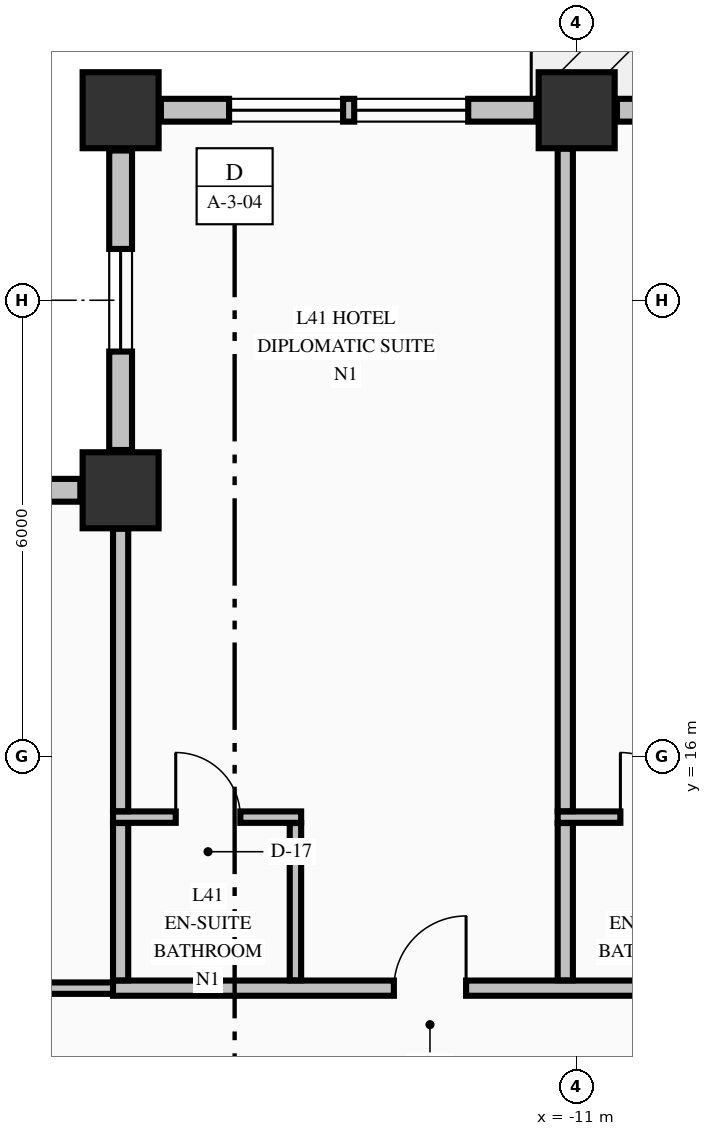
"""IFC4 building model, lengths in metres.
Left out: names, types, materials, properties, quantities, classifications, styles, units other than length and angle.
Written with IfcOpenShell. Run it as: python <this file> out.ifc"""

import sys

from ifc_helpers import new_model, si_unit, direction, frame, frame_2d, origin, origin_2d, place, context, subcontext, project, spatial, rectangle, extrude, element, fill, save


model = new_model("IFC4")
c1 = context("Model", 3, precision=1e-05, world=origin(), true_north=direction((0.0, 1.0)))
c2 = subcontext(c1, "Body", "Model", "MODEL_VIEW")
j1 = project(units=[si_unit("LENGTHUNIT", "METRE"), si_unit("PLANEANGLEUNIT", "RADIAN")], contexts=[c1])
p1 = place(None, origin())
s1 = spatial("IfcSite", under=j1, at=p1, CompositionType="ELEMENT")
p2 = place(p1, origin())
s2 = spatial("IfcBuilding", under=s1, at=p2, CompositionType="ELEMENT")
p3 = place(p2, frame((0.0, 0.0, 162.66)))
s3 = spatial("IfcBuildingStorey", under=s2, at=p3, CompositionType="ELEMENT", Elevation=162.66)
for number, where, z_axis, x_axis in (
    (1, (-17.0, 24.5, -0.25), (0.0, 0.0, 1.0), (1.0, 0.0, 0.0)),
    (2, (-11.0, 24.5, -0.25), (0.0, 0.0, 1.0), (1.0, 0.0, 0.0)),
    (3, (-17.0, 19.5, -0.25), (0.0, 0.0, 1.0), (1.0, 0.0, 0.0)),
):
    element("IfcColumn", number, at=place(p3, frame(where, z_axis=z_axis, x_axis=x_axis)), inside=s3, PredefinedType="COLUMN", context=c2, shape_type="SweptSolid", body=[
        extrude(rectangle(XDim=1.0, YDim=1.0, at=origin_2d()), origin(), (0.0, 0.0, 1.0), 3.4),
    ])
p4 = place(p3, frame((-17.0, 23.97, 0.0), z_axis=(0.0, 0.0, 1.0), x_axis=(0.0, -1.0, 0.0)))
e4 = element("IfcWall", 4, at=p4, inside=s3, PredefinedType="STANDARD", context=c2, shape_type="SweptSolid", body=[
    extrude(rectangle(XDim=3.94, YDim=0.3, at=frame_2d((1.97, 0.0))), origin(), (0.0, 0.0, 1.0), 2.542),
])
p5 = place(p4, frame((1.295, 0.0, 0.68)))
e5 = element("IfcOpeningElement", 5, at=p5, cuts=e4, PredefinedType="OPENING", context=c2, shape_type="SweptSolid", body=[
    extrude(rectangle(XDim=1.35, YDim=1.42, at=frame_2d((0.675, 0.71))), frame((0.0, 0.16, 0.0), z_axis=(0.0, -1.0, 0.0), x_axis=(1.0, 0.0, 0.0)), (0.0, 0.0, 1.0), 0.32),
])
p6 = place(p3, frame((-17.53, 19.5, 0.0), z_axis=(0.0, 0.0, 1.0), x_axis=(-1.0, 0.0, 0.0)))
e6 = element("IfcWall", 6, at=p6, inside=s3, PredefinedType="STANDARD", context=c2, shape_type="SweptSolid", body=[
    extrude(rectangle(XDim=3.94, YDim=0.3, at=frame_2d((1.97, 0.0))), origin(), (0.0, 0.0, 1.0), 2.542),
])
p7 = place(p6, frame((1.295, 0.0, 0.68)))
e7 = element("IfcOpeningElement", 7, at=p7, cuts=e6, PredefinedType="OPENING", context=c2, shape_type="SweptSolid", body=[
    extrude(rectangle(XDim=1.35, YDim=1.42, at=frame_2d((0.675, 0.71))), frame((0.0, 0.16, 0.0), z_axis=(0.0, -1.0, 0.0), x_axis=(1.0, 0.0, 0.0)), (0.0, 0.0, 1.0), 0.32),
])
p8 = place(p3, frame((-11.53, 24.5, 0.0), z_axis=(0.0, 0.0, 1.0), x_axis=(-1.0, 0.0, 0.0)))
e8 = element("IfcWall", 8, at=p8, inside=s3, PredefinedType="STANDARD", context=c2, shape_type="SweptSolid", body=[
    extrude(rectangle(XDim=4.94, YDim=0.3, at=frame_2d((2.47, 0.0))), origin(), (0.0, 0.0, 1.0), 2.542),
])
p9 = place(p8, frame((0.897, 0.0, 0.72)))
e9 = element("IfcOpeningElement", 9, at=p9, cuts=e8, PredefinedType="OPENING", context=c2, shape_type="SweptSolid", body=[
    extrude(rectangle(XDim=1.5, YDim=1.6, at=frame_2d((0.75, 0.8))), frame((0.0, 0.16, 0.0), z_axis=(0.0, -1.0, 0.0), x_axis=(1.0, 0.0, 0.0)), (0.0, 0.0, 1.0), 0.32),
])
p10 = place(p8, frame((2.543, 0.0, 0.72)))
e10 = element("IfcOpeningElement", 10, at=p10, cuts=e8, PredefinedType="OPENING", context=c2, shape_type="SweptSolid", body=[
    extrude(rectangle(XDim=1.5, YDim=1.6, at=frame_2d((0.75, 0.8))), frame((0.0, 0.16, 0.0), z_axis=(0.0, -1.0, 0.0), x_axis=(1.0, 0.0, 0.0)), (0.0, 0.0, 1.0), 0.32),
])
p11 = place(p3, frame((-0.53, 24.5, 0.0), z_axis=(0.0, 0.0, 1.0), x_axis=(-1.0, 0.0, 0.0)))
e11 = element("IfcWall", 11, at=p11, inside=s3, PredefinedType="STANDARD", context=c2, shape_type="SweptSolid", body=[
    extrude(rectangle(XDim=9.94, YDim=0.3, at=frame_2d((4.97, 0.0))), origin(), (0.0, 0.0, 1.0), 2.542),
])
p12 = place(p11, frame((3.717, 0.0, 0.0)))
e12 = element("IfcOpeningElement", 12, at=p12, cuts=e11, PredefinedType="OPENING", context=c2, shape_type="SweptSolid", body=[
    extrude(rectangle(XDim=1.1, YDim=2.15, at=frame_2d((0.55, 1.075))), frame((0.0, 0.16, 0.0), z_axis=(0.0, -1.0, 0.0), x_axis=(1.0, 0.0, 0.0)), (0.0, 0.0, 1.0), 0.32),
])
p13 = place(p11, frame((1.238, 0.0, 0.72)))
e13 = element("IfcOpeningElement", 13, at=p13, cuts=e11, PredefinedType="OPENING", context=c2, shape_type="SweptSolid", body=[
    extrude(rectangle(XDim=1.5, YDim=1.6, at=frame_2d((0.75, 0.8))), frame((0.0, 0.16, 0.0), z_axis=(0.0, -1.0, 0.0), x_axis=(1.0, 0.0, 0.0)), (0.0, 0.0, 1.0), 0.32),
])
p14 = place(p11, frame((7.202, 0.0, 0.72)))
e14 = element("IfcOpeningElement", 14, at=p14, cuts=e11, PredefinedType="OPENING", context=c2, shape_type="SweptSolid", body=[
    extrude(rectangle(XDim=1.5, YDim=1.6, at=frame_2d((0.75, 0.8))), frame((0.0, 0.16, 0.0), z_axis=(0.0, -1.0, 0.0), x_axis=(1.0, 0.0, 0.0)), (0.0, 0.0, 1.0), 0.32),
])
p15 = place(p3, frame((-20.075, 12.95, 0.0), z_axis=(0.0, 0.0, 1.0), x_axis=(1.0, 0.0, 0.0)))
e15 = element("IfcWall", 15, at=p15, inside=s3, PredefinedType="PARTITIONING", context=c2, shape_type="SweptSolid", body=[
    extrude(rectangle(XDim=3.175, YDim=0.15, at=frame_2d((1.587, 0.0))), origin(), (0.0, 0.0, 1.0), 3.15),
])
p16 = place(p3, frame((-17.1, 12.95, 0.0), z_axis=(0.0, 0.0, 1.0), x_axis=(1.0, 0.0, 0.0)))
e16 = element("IfcWall", 16, at=p16, inside=s3, PredefinedType="PARTITIONING", context=c2, shape_type="SweptSolid", body=[
    extrude(rectangle(XDim=39.2, YDim=0.2, at=frame_2d((19.6, 0.0))), origin(), (0.0, 0.0, 1.0), 3.15),
])
p17 = place(p16, frame((3.695, 0.0, 0.0)))
e17 = element("IfcOpeningElement", 17, at=p17, cuts=e16, PredefinedType="OPENING", context=c2, shape_type="SweptSolid", body=[
    extrude(rectangle(XDim=0.95, YDim=2.15, at=frame_2d((0.475, 1.075))), frame((0.0, 0.11, 0.0), z_axis=(0.0, -1.0, 0.0), x_axis=(1.0, 0.0, 0.0)), (0.0, 0.0, 1.0), 0.22),
])
p18 = place(p16, frame((12.925, 0.0, 0.0)))
e18 = element("IfcOpeningElement", 18, at=p18, cuts=e16, PredefinedType="OPENING", context=c2, shape_type="SweptSolid", body=[
    extrude(rectangle(XDim=0.95, YDim=2.15, at=frame_2d((0.475, 1.075))), frame((0.0, 0.11, 0.0), z_axis=(0.0, -1.0, 0.0), x_axis=(1.0, 0.0, 0.0)), (0.0, 0.0, 1.0), 0.22),
])
p19 = place(p16, frame((24.525, 0.0, 0.0)))
e19 = element("IfcOpeningElement", 19, at=p19, cuts=e16, PredefinedType="OPENING", context=c2, shape_type="SweptSolid", body=[
    extrude(rectangle(XDim=0.95, YDim=2.15, at=frame_2d((0.475, 1.075))), frame((0.0, 0.11, 0.0), z_axis=(0.0, -1.0, 0.0), x_axis=(1.0, 0.0, 0.0)), (0.0, 0.0, 1.0), 0.22),
])
p20 = place(p16, frame((33.695, 0.0, 0.0)))
e20 = element("IfcOpeningElement", 20, at=p20, cuts=e16, PredefinedType="OPENING", context=c2, shape_type="SweptSolid", body=[
    extrude(rectangle(XDim=0.95, YDim=2.15, at=frame_2d((0.475, 1.075))), frame((0.0, 0.11, 0.0), z_axis=(0.0, -1.0, 0.0), x_axis=(1.0, 0.0, 0.0)), (0.0, 0.0, 1.0), 0.22),
])
p21 = place(p3, frame((-17.1, 15.2, 0.0), z_axis=(0.0, 0.0, 1.0), x_axis=(1.0, 0.0, 0.0)))
e21 = element("IfcWall", 21, at=p21, inside=s3, PredefinedType="PARTITIONING", context=c2, shape_type="SweptSolid", body=[
    extrude(rectangle(XDim=2.475, YDim=0.15, at=frame_2d((1.238, 0.0))), origin(), (0.0, 0.0, 1.0), 3.15),
])
p22 = place(p21, frame((0.825, 0.0, 0.0)))
e22 = element("IfcOpeningElement", 22, at=p22, cuts=e21, PredefinedType="OPENING", context=c2, shape_type="SweptSolid", body=[
    extrude(rectangle(XDim=0.85, YDim=2.1, at=frame_2d((0.425, 1.05))), frame((0.0, 0.085, 0.0), z_axis=(0.0, -1.0, 0.0), x_axis=(1.0, 0.0, 0.0)), (0.0, 0.0, 1.0), 0.17),
])
p23 = place(p3, frame((-11.25, 15.2, 0.0), z_axis=(0.0, 0.0, 1.0), x_axis=(1.0, 0.0, 0.0)))
e23 = element("IfcWall", 23, at=p23, inside=s3, PredefinedType="PARTITIONING", context=c2, shape_type="SweptSolid", body=[
    extrude(rectangle(XDim=2.475, YDim=0.15, at=frame_2d((1.238, 0.0))), origin(), (0.0, 0.0, 1.0), 3.15),
])
p24 = place(p23, frame((0.825, 0.0, 0.0)))
e24 = element("IfcOpeningElement", 24, at=p24, cuts=e23, PredefinedType="OPENING", context=c2, shape_type="SweptSolid", body=[
    extrude(rectangle(XDim=0.85, YDim=2.1, at=frame_2d((0.425, 1.05))), frame((0.0, 0.085, 0.0), z_axis=(0.0, -1.0, 0.0), x_axis=(1.0, 0.0, 0.0)), (0.0, 0.0, 1.0), 0.17),
])
p25 = place(p3, frame((-17.0, 13.053, 0.0), z_axis=(0.0, 0.0, 1.0), x_axis=(0.0, 1.0, 0.0)))
e25 = element("IfcWall", 25, at=p25, inside=s3, PredefinedType="PARTITIONING", context=c2, shape_type="SweptSolid", body=[
    extrude(rectangle(XDim=2.069, YDim=0.2, at=frame_2d((1.035, 0.0))), origin(), (0.0, 0.0, 1.0), 3.15),
])
p26 = place(p3, frame((-17.0, 15.278, 0.0), z_axis=(0.0, 0.0, 1.0), x_axis=(0.0, 1.0, 0.0)))
e26 = element("IfcWall", 26, at=p26, inside=s3, PredefinedType="PARTITIONING", context=c2, shape_type="SweptSolid", body=[
    extrude(rectangle(XDim=3.716, YDim=0.2, at=frame_2d((1.858, 0.0))), origin(), (0.0, 0.0, 1.0), 3.15),
])
p27 = place(p3, frame((-14.7, 13.053, 0.0), z_axis=(0.0, 0.0, 1.0), x_axis=(0.0, 1.0, 0.0)))
e27 = element("IfcWall", 27, at=p27, inside=s3, PredefinedType="PARTITIONING", context=c2, shape_type="SweptSolid", body=[
    extrude(rectangle(XDim=2.069, YDim=0.15, at=frame_2d((1.035, 0.0))), origin(), (0.0, 0.0, 1.0), 3.15),
])
p28 = place(p3, frame((-11.15, 13.053, 0.0), z_axis=(0.0, 0.0, 1.0), x_axis=(0.0, 1.0, 0.0)))
e28 = element("IfcWall", 28, at=p28, inside=s3, PredefinedType="PARTITIONING", context=c2, shape_type="SweptSolid", body=[
    extrude(rectangle(XDim=2.069, YDim=0.2, at=frame_2d((1.035, 0.0))), origin(), (0.0, 0.0, 1.0), 2.342),
])
p29 = place(p3, frame((-11.15, 15.278, 0.0), z_axis=(0.0, 0.0, 1.0), x_axis=(0.0, 1.0, 0.0)))
e29 = element("IfcWall", 29, at=p29, inside=s3, PredefinedType="PARTITIONING", context=c2, shape_type="SweptSolid", body=[
    extrude(rectangle(XDim=8.716, YDim=0.2, at=frame_2d((4.358, 0.0))), origin(), (0.0, 0.0, 1.0), 2.342),
])
p30 = place(p5, origin())
e30 = element("IfcWindow", 30, at=p30, inside=s3, PartitioningType="SINGLE_PANEL", PredefinedType="WINDOW", context=c2, shape_type="SweptSolid", body=[
    extrude(rectangle(XDim=1.35, YDim=1.42, at=frame_2d((0.675, 0.71))), frame((0.0, 0.03, 0.0), z_axis=(0.0, -1.0, 0.0), x_axis=(1.0, 0.0, 0.0)), (0.0, 0.0, 1.0), 0.06),
])
fill(e5, e30)
p31 = place(p9, origin())
e31 = element("IfcWindow", 31, at=p31, inside=s3, PartitioningType="SINGLE_PANEL", PredefinedType="WINDOW", context=c2, shape_type="SweptSolid", body=[
    extrude(rectangle(XDim=1.5, YDim=1.6, at=frame_2d((0.75, 0.8))), frame((0.0, 0.03, 0.0), z_axis=(0.0, -1.0, 0.0), x_axis=(1.0, 0.0, 0.0)), (0.0, 0.0, 1.0), 0.06),
])
fill(e9, e31)
p32 = place(p10, origin())
e32 = element("IfcWindow", 32, at=p32, inside=s3, PartitioningType="SINGLE_PANEL", PredefinedType="WINDOW", context=c2, shape_type="SweptSolid", body=[
    extrude(rectangle(XDim=1.5, YDim=1.6, at=frame_2d((0.75, 0.8))), frame((0.0, 0.03, 0.0), z_axis=(0.0, -1.0, 0.0), x_axis=(1.0, 0.0, 0.0)), (0.0, 0.0, 1.0), 0.06),
])
fill(e10, e32)
p33 = place(p17, origin())
e33 = element("IfcDoor", 33, at=p33, inside=s3, OperationType="SINGLE_SWING_RIGHT", PredefinedType="DOOR", context=c2, shape_type="SweptSolid", body=[
    extrude(rectangle(XDim=0.95, YDim=2.15, at=frame_2d((0.475, 1.075))), frame((0.0, 0.025, 0.0), z_axis=(0.0, -1.0, 0.0), x_axis=(1.0, 0.0, 0.0)), (0.0, 0.0, 1.0), 0.05),
])
fill(e17, e33)
p34 = place(p22, origin())
e34 = element("IfcDoor", 34, at=p34, inside=s3, OperationType="SINGLE_SWING_LEFT", PredefinedType="DOOR", context=c2, shape_type="SweptSolid", body=[
    extrude(rectangle(XDim=0.85, YDim=2.1, at=frame_2d((0.425, 1.05))), frame((0.0, 0.025, 0.0), z_axis=(0.0, -1.0, 0.0), x_axis=(1.0, 0.0, 0.0)), (0.0, 0.0, 1.0), 0.05),
])
fill(e22, e34)
p35 = place(p24, origin())
e35 = element("IfcDoor", 35, at=p35, inside=s3, OperationType="SINGLE_SWING_LEFT", PredefinedType="DOOR", context=c2, shape_type="SweptSolid", body=[
    extrude(rectangle(XDim=0.85, YDim=2.1, at=frame_2d((0.425, 1.05))), frame((0.0, 0.025, 0.0), z_axis=(0.0, -1.0, 0.0), x_axis=(1.0, 0.0, 0.0)), (0.0, 0.0, 1.0), 0.05),
])
fill(e24, e35)
save(model, sys.argv[1])
